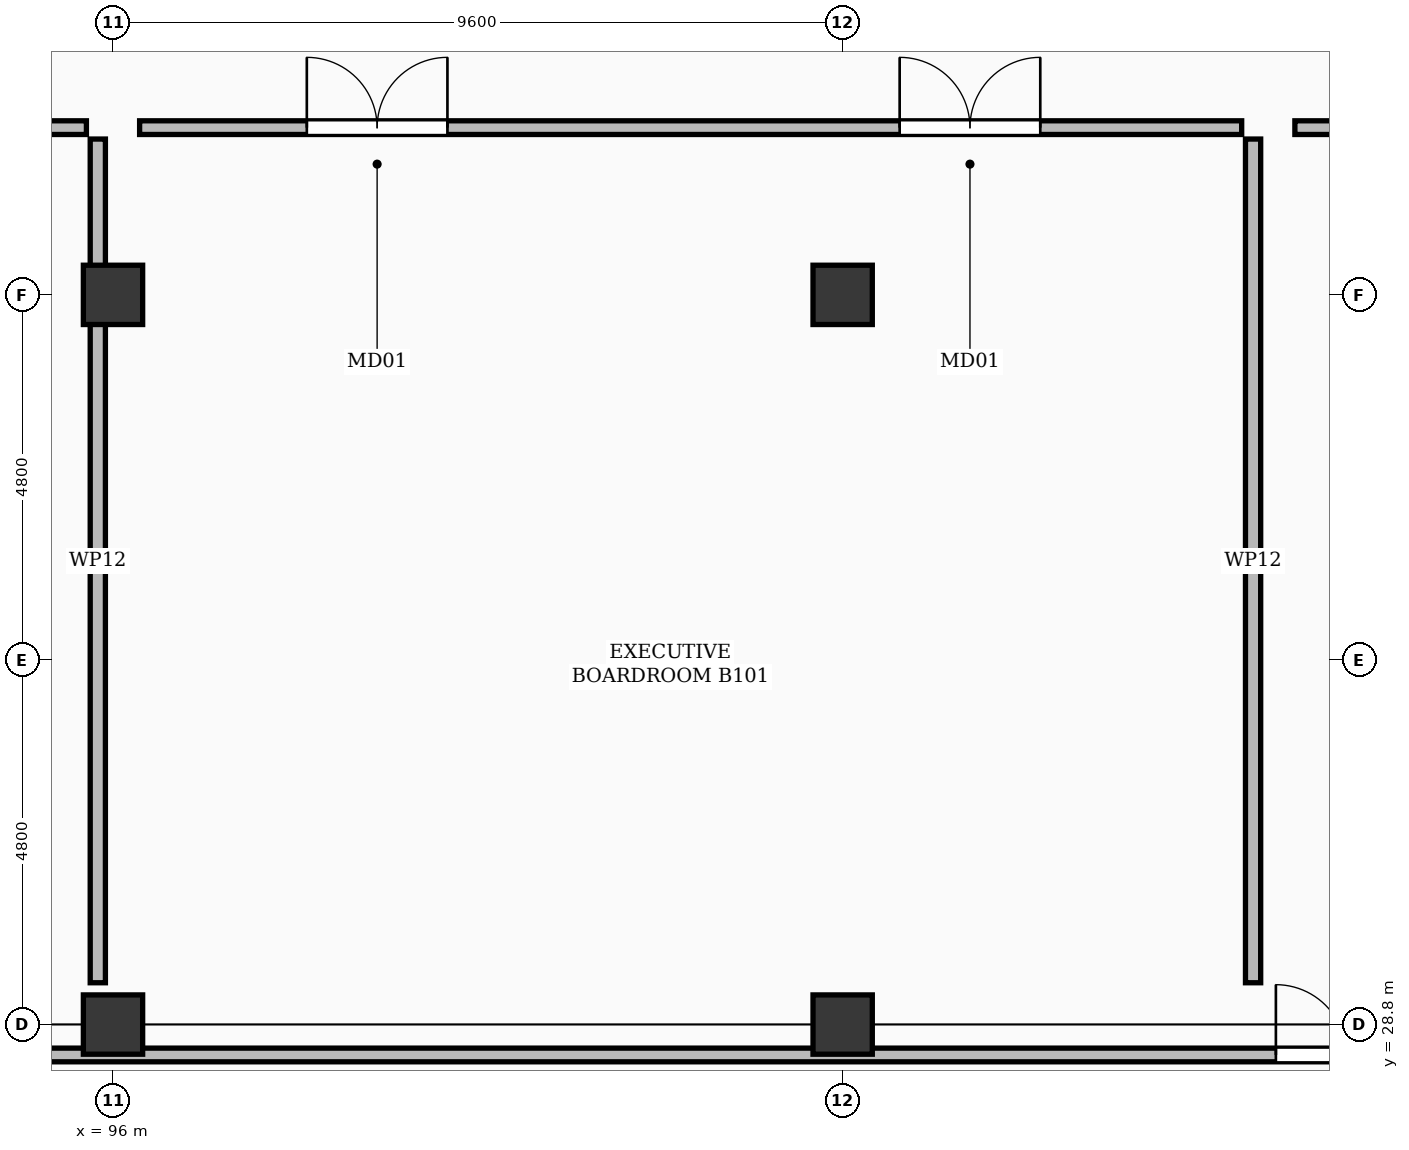
"""IFC4 building model, lengths in metres.
Left out: names, types, materials, properties, quantities, classifications, styles, units other than length and angle.
Written with IfcOpenShell. Run it as: python <this file> out.ifc"""

import sys

from ifc_helpers import new_model, si_unit, direction, frame, frame_2d, origin, origin_2d, place, context, subcontext, project, spatial, rectangle, extrude, element, fill, save


model = new_model("IFC4")
c1 = context("Model", 3, precision=1e-05, world=origin(), true_north=direction((0.0, 1.0)))
c2 = subcontext(c1, "Body", "Model", "MODEL_VIEW")
j1 = project(units=[si_unit("LENGTHUNIT", "METRE"), si_unit("PLANEANGLEUNIT", "RADIAN")], contexts=[c1])
p1 = place(None, origin())
s1 = spatial("IfcSite", under=j1, at=p1, CompositionType="ELEMENT")
p2 = place(p1, origin())
s2 = spatial("IfcBuilding", under=s1, at=p2, CompositionType="ELEMENT")
p3 = place(p2, frame((0.0, 0.0, 6.0)))
s3 = spatial("IfcBuildingStorey", under=s2, at=p3, CompositionType="ELEMENT", Elevation=6.0)
for number, where, z_axis, x_axis in (
    (1, (96.0, 28.8, 0.0), (0.0, 0.0, 1.0), (1.0, 0.0, 0.0)),
    (2, (96.0, 38.4, 0.0), (0.0, 0.0, 1.0), (1.0, 0.0, 0.0)),
    (3, (105.6, 28.8, 0.0), (0.0, 0.0, 1.0), (1.0, 0.0, 0.0)),
    (4, (105.6, 38.4, 0.0), (0.0, 0.0, 1.0), (1.0, 0.0, 0.0)),
):
    element("IfcColumn", number, at=place(p3, frame(where, z_axis=z_axis, x_axis=x_axis)), inside=s3, PredefinedType="COLUMN", context=c2, shape_type="SweptSolid", body=[
        extrude(rectangle(XDim=0.78, YDim=0.78, at=origin_2d()), origin(), (0.0, 0.0, 1.0), 5.4),
    ])
p4 = place(p3, frame((76.95, 40.6, 0.0), z_axis=(0.0, 0.0, 1.0), x_axis=(1.0, 0.0, 0.0)))
e5 = element("IfcWall", 5, at=p4, inside=s3, PredefinedType="PARTITIONING", context=c2, shape_type="SweptSolid", body=[
    extrude(rectangle(XDim=18.7, YDim=0.18, at=frame_2d((9.35, 0.0))), origin(), (0.0, 0.0, 1.0), 4.312),
])
p5 = place(p4, frame((2.2, 0.0, 0.0)))
e6 = element("IfcOpeningElement", 6, at=p5, cuts=e5, PredefinedType="OPENING", context=c2, shape_type="SweptSolid", body=[
    extrude(rectangle(XDim=1.85, YDim=2.35, at=frame_2d((0.925, 1.175))), frame((0.0, 0.102, 0.0), z_axis=(0.0, -1.0, 0.0), x_axis=(1.0, 0.0, 0.0)), (0.0, 0.0, 1.0), 0.204),
])
p6 = place(p4, frame((14.2, 0.0, 0.0)))
e7 = element("IfcOpeningElement", 7, at=p6, cuts=e5, PredefinedType="OPENING", context=c2, shape_type="SweptSolid", body=[
    extrude(rectangle(XDim=1.85, YDim=2.35, at=frame_2d((0.925, 1.175))), frame((0.0, 0.102, 0.0), z_axis=(0.0, -1.0, 0.0), x_axis=(1.0, 0.0, 0.0)), (0.0, 0.0, 1.0), 0.204),
])
p7 = place(p3, frame((95.8, 29.35, 0.0), z_axis=(0.0, 0.0, 1.0), x_axis=(0.0, 1.0, 0.0)))
e8 = element("IfcWall", 8, at=p7, inside=s3, PredefinedType="PARTITIONING", context=c2, shape_type="SweptSolid", body=[
    extrude(rectangle(XDim=11.1, YDim=0.2, at=frame_2d((5.55, 0.0))), origin(), (0.0, 0.0, 1.0), 4.312),
])
p8 = place(p3, frame((96.35, 40.6, 0.0), z_axis=(0.0, 0.0, 1.0), x_axis=(1.0, 0.0, 0.0)))
e9 = element("IfcWall", 9, at=p8, inside=s3, PredefinedType="PARTITIONING", context=c2, shape_type="SweptSolid", body=[
    extrude(rectangle(XDim=14.5, YDim=0.18, at=frame_2d((7.25, 0.0))), origin(), (0.0, 0.0, 1.0), 4.312),
])
p9 = place(p8, frame((2.2, 0.0, 0.0)))
e10 = element("IfcOpeningElement", 10, at=p9, cuts=e9, PredefinedType="OPENING", context=c2, shape_type="SweptSolid", body=[
    extrude(rectangle(XDim=1.85, YDim=2.35, at=frame_2d((0.925, 1.175))), frame((0.0, 0.102, 0.0), z_axis=(0.0, -1.0, 0.0), x_axis=(1.0, 0.0, 0.0)), (0.0, 0.0, 1.0), 0.204),
])
p10 = place(p8, frame((10.0, 0.0, 0.0)))
e11 = element("IfcOpeningElement", 11, at=p10, cuts=e9, PredefinedType="OPENING", context=c2, shape_type="SweptSolid", body=[
    extrude(rectangle(XDim=1.85, YDim=2.35, at=frame_2d((0.925, 1.175))), frame((0.0, 0.102, 0.0), z_axis=(0.0, -1.0, 0.0), x_axis=(1.0, 0.0, 0.0)), (0.0, 0.0, 1.0), 0.204),
])
p11 = place(p3, frame((111.0, 29.35, 0.0), z_axis=(0.0, 0.0, 1.0), x_axis=(0.0, 1.0, 0.0)))
e12 = element("IfcWall", 12, at=p11, inside=s3, PredefinedType="PARTITIONING", context=c2, shape_type="SweptSolid", body=[
    extrude(rectangle(XDim=11.1, YDim=0.2, at=frame_2d((5.55, 0.0))), origin(), (0.0, 0.0, 1.0), 4.312),
])
p12 = place(p3, frame((111.55, 40.6, 0.0), z_axis=(0.0, 0.0, 1.0), x_axis=(1.0, 0.0, 0.0)))
e13 = element("IfcWall", 13, at=p12, inside=s3, PredefinedType="PARTITIONING", context=c2, shape_type="SweptSolid", body=[
    extrude(rectangle(XDim=13.7, YDim=0.18, at=frame_2d((6.85, 0.0))), origin(), (0.0, 0.0, 1.0), 4.312),
])
p13 = place(p12, frame((2.2, 0.0, 0.0)))
e14 = element("IfcOpeningElement", 14, at=p13, cuts=e13, PredefinedType="OPENING", context=c2, shape_type="SweptSolid", body=[
    extrude(rectangle(XDim=1.85, YDim=2.35, at=frame_2d((0.925, 1.175))), frame((0.0, 0.102, 0.0), z_axis=(0.0, -1.0, 0.0), x_axis=(1.0, 0.0, 0.0)), (0.0, 0.0, 1.0), 0.204),
])
p14 = place(p12, frame((9.2, 0.0, 0.0)))
e15 = element("IfcOpeningElement", 15, at=p14, cuts=e13, PredefinedType="OPENING", context=c2, shape_type="SweptSolid", body=[
    extrude(rectangle(XDim=1.85, YDim=2.35, at=frame_2d((0.925, 1.175))), frame((0.0, 0.102, 0.0), z_axis=(0.0, -1.0, 0.0), x_axis=(1.0, 0.0, 0.0)), (0.0, 0.0, 1.0), 0.204),
])
p15 = place(p3, frame((65.75, 28.4, 0.0), z_axis=(0.0, 0.0, 1.0), x_axis=(1.0, 0.0, 0.0)))
e16 = element("IfcWall", 16, at=p15, inside=s3, PredefinedType="PARTITIONING", context=c2, shape_type="SweptSolid", body=[
    extrude(rectangle(XDim=50.1, YDim=0.18, at=frame_2d((25.05, 0.0))), origin(), (0.0, 0.0, 1.0), 3.692),
])
p16 = place(p15, frame((2.4, 0.0, 0.0)))
e17 = element("IfcOpeningElement", 17, at=p16, cuts=e16, PredefinedType="OPENING", context=c2, shape_type="SweptSolid", body=[
    extrude(rectangle(XDim=1.85, YDim=2.35, at=frame_2d((0.925, 1.175))), frame((0.0, 0.102, 0.0), z_axis=(0.0, -1.0, 0.0), x_axis=(1.0, 0.0, 0.0)), (0.0, 0.0, 1.0), 0.204),
])
p17 = place(p15, frame((45.55, 0.0, 0.0)))
e18 = element("IfcOpeningElement", 18, at=p17, cuts=e16, PredefinedType="OPENING", context=c2, shape_type="SweptSolid", body=[
    extrude(rectangle(XDim=1.85, YDim=2.35, at=frame_2d((0.925, 1.175))), frame((0.0, 0.102, 0.0), z_axis=(0.0, -1.0, 0.0), x_axis=(1.0, 0.0, 0.0)), (0.0, 0.0, 1.0), 0.204),
])
p18 = place(p15, frame((25.2, 0.0, 0.0)))
e19 = element("IfcOpeningElement", 19, at=p18, cuts=e16, PredefinedType="OPENING", context=c2, shape_type="SweptSolid", body=[
    extrude(rectangle(XDim=1.85, YDim=2.35, at=frame_2d((0.925, 1.175))), frame((0.0, 0.102, 0.0), z_axis=(0.0, -1.0, 0.0), x_axis=(1.0, 0.0, 0.0)), (0.0, 0.0, 1.0), 0.204),
])
p19 = place(p9, origin())
e20 = element("IfcDoor", 20, at=p19, inside=s3, OperationType="DOUBLE_DOOR_SINGLE_SWING", PredefinedType="DOOR", context=c2, shape_type="SweptSolid", body=[
    extrude(rectangle(XDim=1.85, YDim=2.35, at=frame_2d((0.925, 1.175))), frame((0.0, 0.025, 0.0), z_axis=(0.0, -1.0, 0.0), x_axis=(1.0, 0.0, 0.0)), (0.0, 0.0, 1.0), 0.05),
])
fill(e10, e20)
p20 = place(p10, origin())
e21 = element("IfcDoor", 21, at=p20, inside=s3, OperationType="DOUBLE_DOOR_SINGLE_SWING", PredefinedType="DOOR", context=c2, shape_type="SweptSolid", body=[
    extrude(rectangle(XDim=1.85, YDim=2.35, at=frame_2d((0.925, 1.175))), frame((0.0, 0.025, 0.0), z_axis=(0.0, -1.0, 0.0), x_axis=(1.0, 0.0, 0.0)), (0.0, 0.0, 1.0), 0.05),
])
fill(e11, e21)
p21 = place(p17, origin())
e22 = element("IfcDoor", 22, at=p21, inside=s3, OperationType="DOUBLE_DOOR_SINGLE_SWING", PredefinedType="DOOR", context=c2, shape_type="SweptSolid", body=[
    extrude(rectangle(XDim=1.85, YDim=2.35, at=frame_2d((0.925, 1.175))), frame((0.0, 0.025, 0.0), z_axis=(0.0, -1.0, 0.0), x_axis=(1.0, 0.0, 0.0)), (0.0, 0.0, 1.0), 0.05),
])
fill(e18, e22)
save(model, sys.argv[1])
